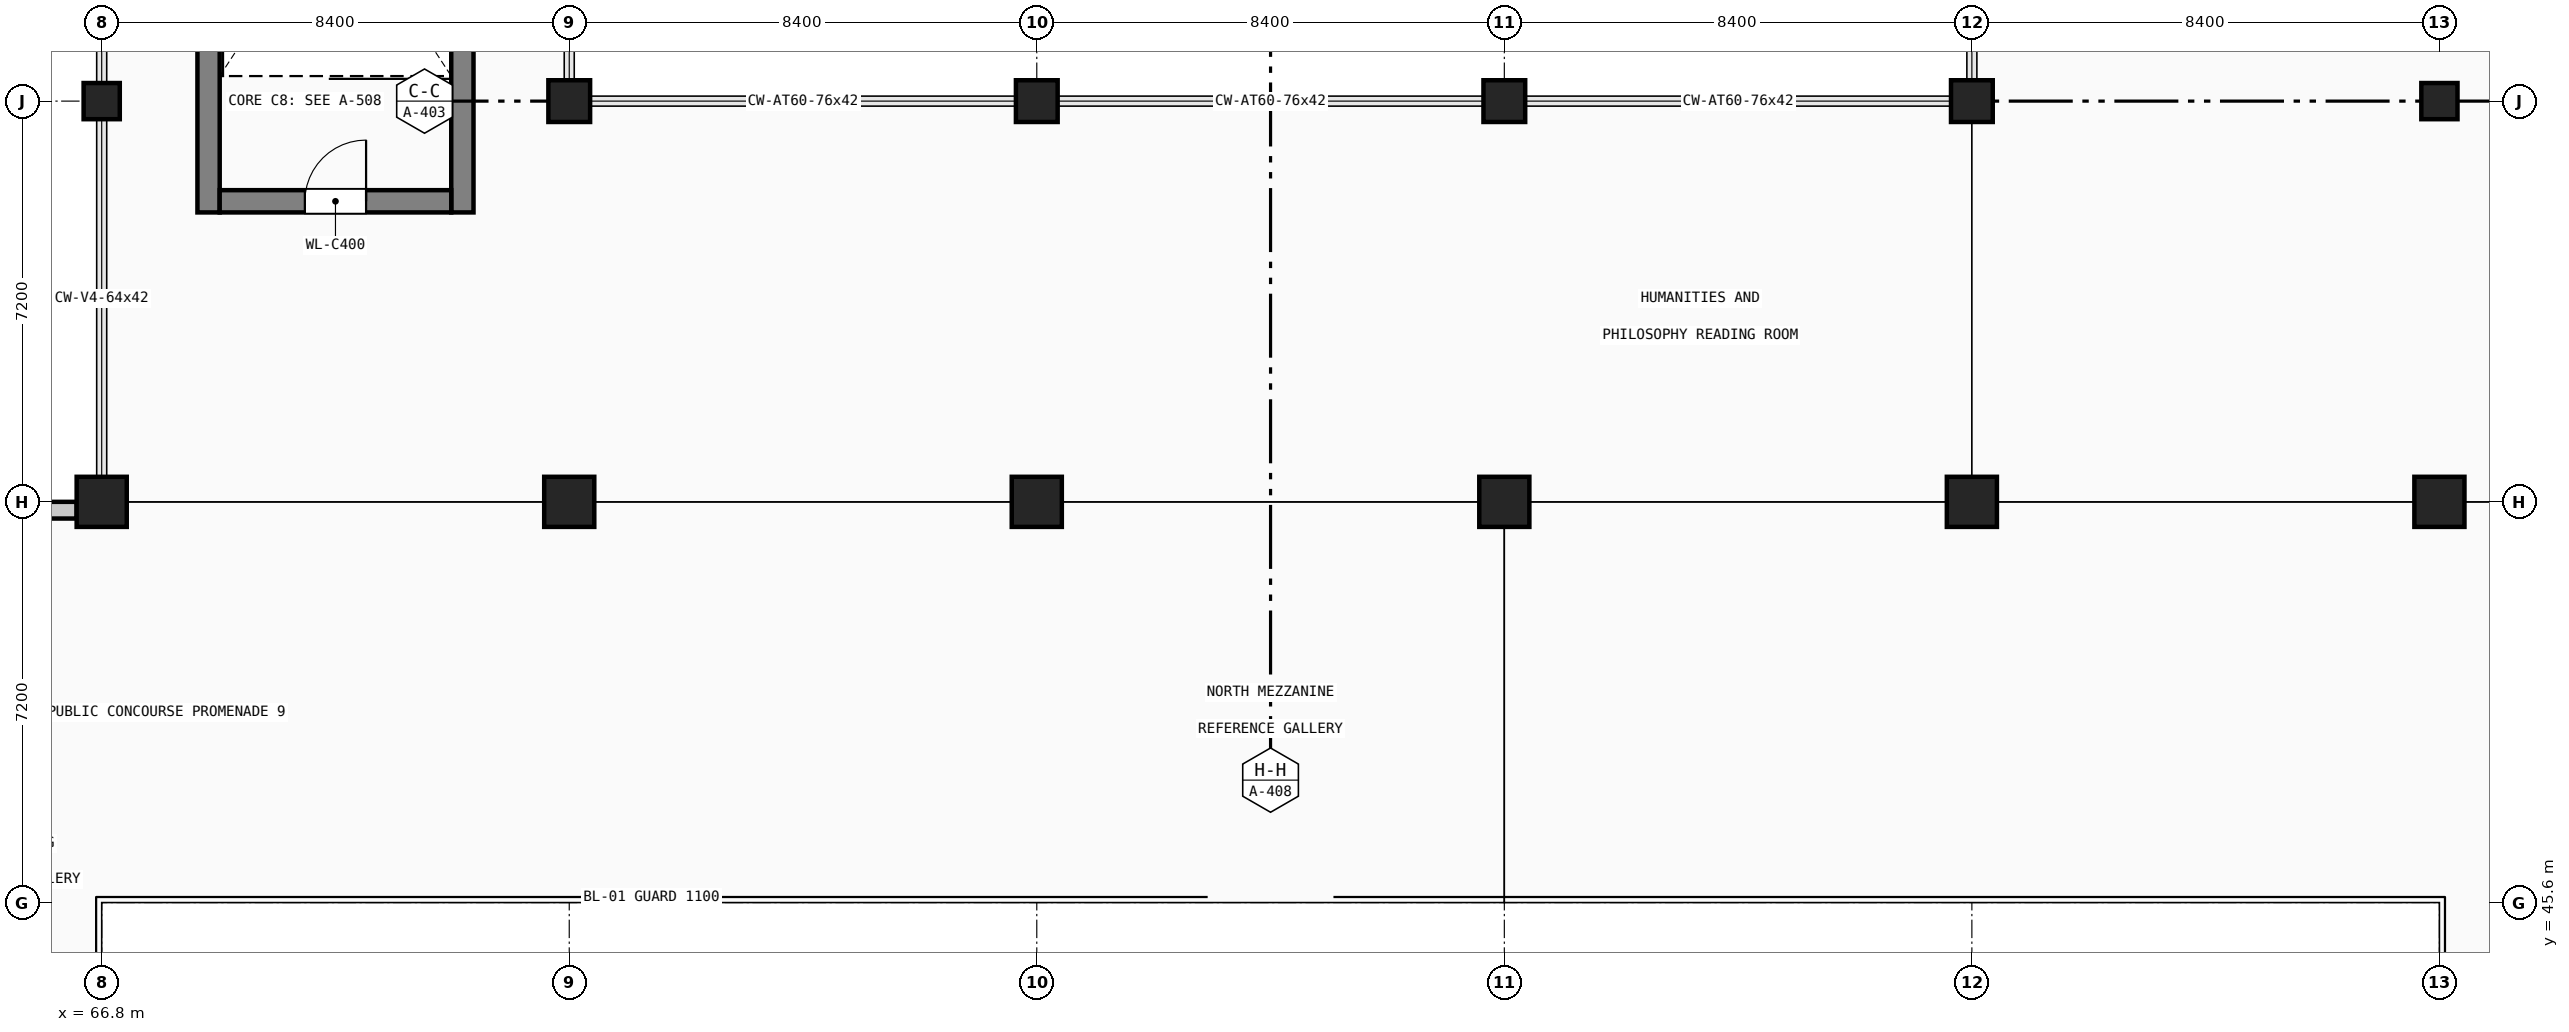
"""IFC4 building model, lengths in metres.
Left out: names, types, materials, properties, quantities, classifications, styles, units other than length and angle.
Written with IfcOpenShell. Run it as: python <this file> out.ifc"""

import sys

from ifc_helpers import new_model, si_unit, direction, frame, frame_2d, origin, origin_2d, place, context, subcontext, project, spatial, rectangle, circle, extrude, element, fill, save


model = new_model("IFC4")
c1 = context("Model", 3, precision=1e-05, world=origin(), true_north=direction((0.0, 1.0)))
c2 = subcontext(c1, "Body", "Model", "MODEL_VIEW")
j1 = project(units=[si_unit("LENGTHUNIT", "METRE"), si_unit("PLANEANGLEUNIT", "RADIAN")], contexts=[c1])
p1 = place(None, origin())
s1 = spatial("IfcSite", under=j1, at=p1, CompositionType="ELEMENT")
p2 = place(p1, origin())
s2 = spatial("IfcBuilding", under=s1, at=p2, CompositionType="ELEMENT")
p3 = place(p2, frame((0.0, 0.0, 14.4)))
s3 = spatial("IfcBuildingStorey", under=s2, at=p3, CompositionType="ELEMENT", Elevation=14.4)
p4 = place(p3, frame((66.8, 52.8, 0.0), z_axis=(0.0, 0.0, 1.0), x_axis=(1.0, 0.0, 0.0)))
e1 = element("IfcColumn", 1, at=p4, inside=s3, PredefinedType="COLUMN", context=c2, shape_type="SweptSolid", body=[
    extrude(rectangle(XDim=0.9, YDim=0.9, at=origin_2d()), origin(), (0.0, 0.0, 1.0), 4.48),
])
p5 = place(p3, frame((66.8, 60.0, 0.0), z_axis=(0.0, 0.0, 1.0), x_axis=(1.0, 0.0, 0.0)))
e2 = element("IfcColumn", 2, at=p5, inside=s3, PredefinedType="COLUMN", context=c2, shape_type="SweptSolid", body=[
    extrude(rectangle(XDim=0.65, YDim=0.65, at=origin_2d()), origin(), (0.0, 0.0, 1.0), 4.48),
])
p6 = place(p3, frame((75.2, 52.8, 0.0), z_axis=(0.0, 0.0, 1.0), x_axis=(1.0, 0.0, 0.0)))
e3 = element("IfcColumn", 3, at=p6, inside=s3, PredefinedType="COLUMN", context=c2, shape_type="SweptSolid", body=[
    extrude(rectangle(XDim=0.9, YDim=0.9, at=origin_2d()), origin(), (0.0, 0.0, 1.0), 4.48),
])
p7 = place(p3, frame((75.2, 60.0, 0.0), z_axis=(0.0, 0.0, 1.0), x_axis=(1.0, 0.0, 0.0)))
e4 = element("IfcColumn", 4, at=p7, inside=s3, PredefinedType="COLUMN", context=c2, shape_type="SweptSolid", body=[
    extrude(circle(Radius=0.375, at=origin_2d()), origin(), (0.0, 0.0, 1.0), 4.48),
])
p8 = place(p3, frame((83.6, 52.8, 0.0), z_axis=(0.0, 0.0, 1.0), x_axis=(1.0, 0.0, 0.0)))
e5 = element("IfcColumn", 5, at=p8, inside=s3, PredefinedType="COLUMN", context=c2, shape_type="SweptSolid", body=[
    extrude(rectangle(XDim=0.9, YDim=0.9, at=origin_2d()), origin(), (0.0, 0.0, 1.0), 4.48),
])
p9 = place(p3, frame((83.6, 60.0, 0.0), z_axis=(0.0, 0.0, 1.0), x_axis=(1.0, 0.0, 0.0)))
e6 = element("IfcColumn", 6, at=p9, inside=s3, PredefinedType="COLUMN", context=c2, shape_type="SweptSolid", body=[
    extrude(circle(Radius=0.375, at=origin_2d()), origin(), (0.0, 0.0, 1.0), 4.48),
])
p10 = place(p3, frame((92.0, 52.8, 0.0), z_axis=(0.0, 0.0, 1.0), x_axis=(1.0, 0.0, 0.0)))
e7 = element("IfcColumn", 7, at=p10, inside=s3, PredefinedType="COLUMN", context=c2, shape_type="SweptSolid", body=[
    extrude(rectangle(XDim=0.9, YDim=0.9, at=origin_2d()), origin(), (0.0, 0.0, 1.0), 4.48),
])
p11 = place(p3, frame((92.0, 60.0, 0.0), z_axis=(0.0, 0.0, 1.0), x_axis=(1.0, 0.0, 0.0)))
e8 = element("IfcColumn", 8, at=p11, inside=s3, PredefinedType="COLUMN", context=c2, shape_type="SweptSolid", body=[
    extrude(circle(Radius=0.375, at=origin_2d()), origin(), (0.0, 0.0, 1.0), 4.48),
])
p12 = place(p3, frame((100.4, 52.8, 0.0), z_axis=(0.0, 0.0, 1.0), x_axis=(1.0, 0.0, 0.0)))
e9 = element("IfcColumn", 9, at=p12, inside=s3, PredefinedType="COLUMN", context=c2, shape_type="SweptSolid", body=[
    extrude(rectangle(XDim=0.9, YDim=0.9, at=origin_2d()), origin(), (0.0, 0.0, 1.0), 4.48),
])
p13 = place(p3, frame((100.4, 60.0, 0.0), z_axis=(0.0, 0.0, 1.0), x_axis=(1.0, 0.0, 0.0)))
e10 = element("IfcColumn", 10, at=p13, inside=s3, PredefinedType="COLUMN", context=c2, shape_type="SweptSolid", body=[
    extrude(circle(Radius=0.375, at=origin_2d()), origin(), (0.0, 0.0, 1.0), 4.48),
])
p14 = place(p3, frame((108.8, 52.8, 0.0), z_axis=(0.0, 0.0, 1.0), x_axis=(1.0, 0.0, 0.0)))
e11 = element("IfcColumn", 11, at=p14, inside=s3, PredefinedType="COLUMN", context=c2, shape_type="SweptSolid", body=[
    extrude(rectangle(XDim=0.9, YDim=0.9, at=origin_2d()), origin(), (0.0, 0.0, 1.0), 4.48),
])
p15 = place(p3, frame((108.8, 60.0, 0.0), z_axis=(0.0, 0.0, 1.0), x_axis=(1.0, 0.0, 0.0)))
e12 = element("IfcColumn", 12, at=p15, inside=s3, PredefinedType="COLUMN", context=c2, shape_type="SweptSolid", body=[
    extrude(rectangle(XDim=0.65, YDim=0.65, at=origin_2d()), origin(), (0.0, 0.0, 1.0), 4.48),
])
for number, where, z_axis, x_axis in (
    (13, (68.72, 58.0, 0.0), (0.0, 0.0, 1.0), (0.0, 1.0, 0.0)),
    (14, (73.28, 67.2, 0.0), (0.0, 0.0, 1.0), (0.0, -1.0, 0.0)),
):
    element("IfcWall", number, at=place(p3, frame(where, z_axis=z_axis, x_axis=x_axis)), inside=s3, PredefinedType="SHEAR", context=c2, shape_type="SweptSolid", body=[
        extrude(rectangle(XDim=9.2, YDim=0.4, at=frame_2d((4.6, 0.0))), origin(), (0.0, 0.0, 1.0), 4.255),
    ])
p16 = place(p3, frame((73.08, 58.2, 0.0), z_axis=(0.0, 0.0, 1.0), x_axis=(-1.0, 0.0, 0.0)))
e15 = element("IfcWall", 15, at=p16, inside=s3, PredefinedType="SHEAR", context=c2, shape_type="SweptSolid", body=[
    extrude(rectangle(XDim=4.16, YDim=0.4, at=frame_2d((2.08, 0.0))), origin(), (0.0, 0.0, 1.0), 4.255),
])
p17 = place(p16, frame((1.53, 0.0, 0.0)))
e16 = element("IfcOpeningElement", 16, at=p17, cuts=e15, PredefinedType="OPENING", context=c2, shape_type="SweptSolid", body=[
    extrude(rectangle(XDim=1.1, YDim=2.2, at=frame_2d((0.55, 1.1))), frame((0.0, 0.21, 0.0), z_axis=(0.0, -1.0, 0.0), x_axis=(1.0, 0.0, 0.0)), (0.0, 0.0, 1.0), 0.42),
])
p18 = place(p3, frame((58.85, 52.65, 0.0), z_axis=(0.0, 0.0, 1.0), x_axis=(1.0, 0.0, 0.0)))
e17 = element("IfcWall", 17, at=p18, inside=s3, PredefinedType="SOLIDWALL", context=c2, shape_type="SweptSolid", body=[
    extrude(rectangle(XDim=7.5, YDim=0.3, at=frame_2d((3.75, 0.0))), origin(), (0.0, 0.0, 1.0), 3.28),
])
p19 = place(p18, frame((3.0, 0.0, 0.9)))
e18 = element("IfcOpeningElement", 18, at=p19, cuts=e17, PredefinedType="OPENING", context=c2, shape_type="SweptSolid", body=[
    extrude(rectangle(XDim=1.5, YDim=1.8, at=frame_2d((0.75, 0.9))), frame((0.0, 0.16, 0.0), z_axis=(0.0, -1.0, 0.0), x_axis=(1.0, 0.0, 0.0)), (0.0, 0.0, 1.0), 0.32),
])
p20 = place(p17, frame((1.1, 0.0, 0.0), z_axis=(0.0, 0.0, 1.0), x_axis=(-1.0, 0.0, 0.0)))
e19 = element("IfcDoor", 19, at=p20, inside=s3, OperationType="SINGLE_SWING_RIGHT", PredefinedType="DOOR", context=c2, shape_type="SweptSolid", body=[
    extrude(rectangle(XDim=1.1, YDim=2.2, at=frame_2d((0.55, 1.1))), frame((0.0, 0.025, 0.0), z_axis=(0.0, -1.0, 0.0), x_axis=(1.0, 0.0, 0.0)), (0.0, 0.0, 1.0), 0.05),
])
fill(e16, e19)
save(model, sys.argv[1])
